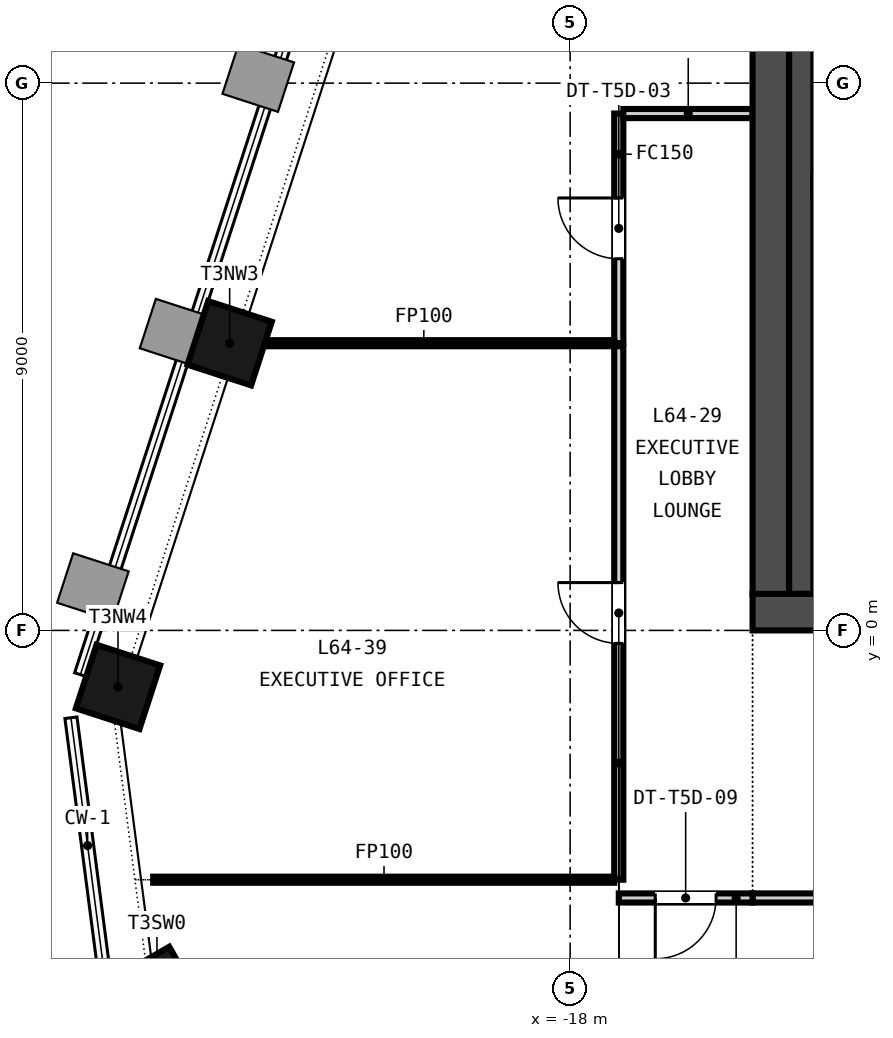
"""IFC4 building model, lengths in metres.
Left out: names, types, materials, properties, quantities, classifications, styles, units other than length and angle.
Written with IfcOpenShell. Run it as: python <this file> out.ifc"""

import sys

from ifc_helpers import new_model, si_unit, direction, frame, frame_2d, origin, origin_2d, place, context, subcontext, project, spatial, rectangle, extrude, element, fill, save


model = new_model("IFC4")
c1 = context("Model", 3, precision=1e-05, world=origin(), true_north=direction((0.0, 1.0)))
c2 = subcontext(c1, "Body", "Model", "MODEL_VIEW")
j1 = project(units=[si_unit("LENGTHUNIT", "METRE"), si_unit("PLANEANGLEUNIT", "RADIAN")], contexts=[c1])
p1 = place(None, origin())
s1 = spatial("IfcSite", under=j1, at=p1, CompositionType="ELEMENT")
p2 = place(p1, origin())
s2 = spatial("IfcBuilding", under=s1, at=p2, CompositionType="ELEMENT")
p3 = place(p2, frame((0.0, 0.0, 252.8)))
s3 = spatial("IfcBuildingStorey", under=s2, at=p3, CompositionType="ELEMENT", Elevation=252.8)
p4 = place(p3, frame((-15.0, 0.3, -0.15), z_axis=(0.0, 0.0, 1.0), x_axis=(1.0, 0.0, 0.0)))
e1 = element("IfcWall", 1, at=p4, inside=s3, PredefinedType="SOLIDWALL", context=c2, shape_type="SweptSolid", body=[
    extrude(rectangle(XDim=30.0, YDim=0.6, at=frame_2d((15.0, 0.0))), origin(), (0.0, 0.0, 1.0), 3.5),
])
p5 = place(p4, frame((5.8, 0.0, 0.15)))
e2 = element("IfcOpeningElement", 2, at=p5, cuts=e1, PredefinedType="OPENING", context=c2, shape_type="SweptSolid", body=[
    extrude(rectangle(XDim=2.4, YDim=2.4, at=frame_2d((1.2, 1.2))), frame((0.0, 0.31, 0.0), z_axis=(0.0, -1.0, 0.0), x_axis=(1.0, 0.0, 0.0)), (0.0, 0.0, 1.0), 0.62),
])
p6 = place(p4, frame((13.8, 0.0, 0.15)))
e3 = element("IfcOpeningElement", 3, at=p6, cuts=e1, PredefinedType="OPENING", context=c2, shape_type="SweptSolid", body=[
    extrude(rectangle(XDim=2.4, YDim=2.4, at=frame_2d((1.2, 1.2))), frame((0.0, 0.31, 0.0), z_axis=(0.0, -1.0, 0.0), x_axis=(1.0, 0.0, 0.0)), (0.0, 0.0, 1.0), 0.62),
])
p7 = place(p4, frame((21.8, 0.0, 0.15)))
e4 = element("IfcOpeningElement", 4, at=p7, cuts=e1, PredefinedType="OPENING", context=c2, shape_type="SweptSolid", body=[
    extrude(rectangle(XDim=2.4, YDim=2.4, at=frame_2d((1.2, 1.2))), frame((0.0, 0.31, 0.0), z_axis=(0.0, -1.0, 0.0), x_axis=(1.0, 0.0, 0.0)), (0.0, 0.0, 1.0), 0.62),
])
p8 = place(p4, frame((1.5, 0.0, 0.15)))
e5 = element("IfcOpeningElement", 5, at=p8, cuts=e1, PredefinedType="OPENING", context=c2, shape_type="SweptSolid", body=[
    extrude(rectangle(XDim=1.2, YDim=2.1, at=frame_2d((0.6, 1.05))), frame((0.0, 0.31, 0.0), z_axis=(0.0, -1.0, 0.0), x_axis=(1.0, 0.0, 0.0)), (0.0, 0.0, 1.0), 0.62),
])
p9 = place(p4, frame((27.3, 0.0, 0.15)))
e6 = element("IfcOpeningElement", 6, at=p9, cuts=e1, PredefinedType="OPENING", context=c2, shape_type="SweptSolid", body=[
    extrude(rectangle(XDim=1.2, YDim=2.1, at=frame_2d((0.6, 1.05))), frame((0.0, 0.31, 0.0), z_axis=(0.0, -1.0, 0.0), x_axis=(1.0, 0.0, 0.0)), (0.0, 0.0, 1.0), 0.62),
])
p10 = place(p3, frame((-14.7, 0.6, -0.15), z_axis=(0.0, 0.0, 1.0), x_axis=(0.0, 1.0, 0.0)))
e7 = element("IfcWall", 7, at=p10, inside=s3, PredefinedType="SOLIDWALL", context=c2, shape_type="SweptSolid", body=[
    extrude(rectangle(XDim=13.8, YDim=0.6, at=frame_2d((6.9, 0.0))), origin(), (0.0, 0.0, 1.0), 3.5),
])
for number, where, z_axis, x_axis in (
    (8, (-23.599, 4.723, -0.15), (0.0, 0.0, 1.0), (-0.309, -0.951, 0.0)),
    (9, (-25.436, -0.928, -0.15), (0.0, 0.0, 1.0), (-0.309, -0.951, 0.0)),
    (10, (-24.795, -5.954, -0.15), (0.0, 0.0, 1.0), (0.5, -0.866, 0.0)),
):
    element("IfcColumn", number, at=place(p3, frame(where, z_axis=z_axis, x_axis=x_axis)), inside=s3, PredefinedType="COLUMN", context=c2, shape_type="SweptSolid", body=[
        extrude(rectangle(XDim=1.1, YDim=1.1, at=origin_2d()), origin(), (0.0, 0.0, 1.0), 3.5),
    ])
p11 = place(p3, frame((-14.2, 0.6, 0.0), z_axis=(0.0, 0.0, 1.0), x_axis=(0.0, 1.0, 0.0)))
e11 = element("IfcWall", 11, at=p11, inside=s3, PredefinedType="SOLIDWALL", context=c2, shape_type="SweptSolid", body=[
    extrude(rectangle(XDim=13.8, YDim=0.4, at=frame_2d((6.9, 0.0))), origin(), (0.0, 0.0, 1.0), 3.35),
])
p12 = place(p3, frame((-0.867, -4.4, 0.0), z_axis=(0.0, 0.0, 1.0), x_axis=(-1.0, 0.0, 0.0)))
e12 = element("IfcWall", 12, at=p12, inside=s3, PredefinedType="PARTITIONING", context=c2, shape_type="SweptSolid", body=[
    extrude(rectangle(XDim=14.133, YDim=0.15, at=frame_2d((7.066, 0.0))), origin(), (0.0, 0.0, 1.0), 2.601),
])
p13 = place(p12, frame((6.167, 0.0, 0.0)))
e13 = element("IfcOpeningElement", 13, at=p13, cuts=e12, PredefinedType="OPENING", context=c2, shape_type="SweptSolid", body=[
    extrude(rectangle(XDim=1.8, YDim=2.1, at=frame_2d((0.9, 1.05))), frame((0.0, 0.085, 0.0), z_axis=(0.0, -1.0, 0.0), x_axis=(1.0, 0.0, 0.0)), (0.0, 0.0, 1.0), 0.17),
])
p14 = place(p3, frame((-15.0, -4.4, 0.0), z_axis=(0.0, 0.0, 1.0), x_axis=(-1.0, 0.0, 0.0)))
e14 = element("IfcWall", 14, at=p14, inside=s3, PredefinedType="PARTITIONING", context=c2, shape_type="SweptSolid", body=[
    extrude(rectangle(XDim=2.2, YDim=0.15, at=frame_2d((1.1, 0.0))), origin(), (0.0, 0.0, 1.0), 2.601),
])
p15 = place(p14, frame((0.6, 0.0, 0.0)))
e15 = element("IfcOpeningElement", 15, at=p15, cuts=e14, PredefinedType="OPENING", context=c2, shape_type="SweptSolid", body=[
    extrude(rectangle(XDim=1.0, YDim=2.1, at=frame_2d((0.5, 1.05))), frame((0.0, 0.085, 0.0), z_axis=(0.0, -1.0, 0.0), x_axis=(1.0, 0.0, 0.0)), (0.0, 0.0, 1.0), 0.17),
])
p16 = place(p3, frame((-17.2, 4.723, 0.0), z_axis=(0.0, 0.0, 1.0), x_axis=(0.0, 1.0, 0.0)))
e16 = element("IfcWall", 16, at=p16, inside=s3, PredefinedType="PARTITIONING", context=c2, shape_type="SweptSolid", body=[
    extrude(rectangle(XDim=3.777, YDim=0.15, at=frame_2d((1.889, 0.0))), origin(), (0.0, 0.0, 1.0), 2.601),
])
p17 = place(p16, frame((1.388, 0.0, 0.0)))
e17 = element("IfcOpeningElement", 17, at=p17, cuts=e16, PredefinedType="OPENING", context=c2, shape_type="SweptSolid", body=[
    extrude(rectangle(XDim=1.0, YDim=2.1, at=frame_2d((0.5, 1.05))), frame((0.0, 0.085, 0.0), z_axis=(0.0, -1.0, 0.0), x_axis=(1.0, 0.0, 0.0)), (0.0, 0.0, 1.0), 0.17),
])
p18 = place(p3, frame((-17.125, 8.5, 0.0), z_axis=(0.0, 0.0, 1.0), x_axis=(1.0, 0.0, 0.0)))
e18 = element("IfcWall", 18, at=p18, inside=s3, PredefinedType="PARTITIONING", context=c2, shape_type="SweptSolid", body=[
    extrude(rectangle(XDim=2.125, YDim=0.15, at=frame_2d((1.062, 0.0))), origin(), (0.0, 0.0, 1.0), 2.601),
])
p19 = place(p3, frame((-23.547, 4.723, 0.0), z_axis=(0.0, 0.0, 1.0), x_axis=(1.0, 0.0, 0.0)))
e19 = element("IfcWall", 19, at=p19, inside=s3, PredefinedType="PARTITIONING", context=c2, shape_type="SweptSolid", body=[
    extrude(rectangle(XDim=6.272, YDim=0.1, at=frame_2d((3.136, 0.0))), origin(), (0.0, 0.0, 1.0), 2.601),
])
p20 = place(p3, frame((-17.2, -4.1, 0.0), z_axis=(0.0, 0.0, 1.0), x_axis=(0.0, 1.0, 0.0)))
e20 = element("IfcWall", 20, at=p20, inside=s3, PredefinedType="PARTITIONING", context=c2, shape_type="SweptSolid", body=[
    extrude(rectangle(XDim=8.773, YDim=0.15, at=frame_2d((4.387, 0.0))), origin(), (0.0, 0.0, 1.0), 2.601),
])
p21 = place(p20, frame((3.886, 0.0, 0.0)))
e21 = element("IfcOpeningElement", 21, at=p21, cuts=e20, PredefinedType="OPENING", context=c2, shape_type="SweptSolid", body=[
    extrude(rectangle(XDim=1.0, YDim=2.1, at=frame_2d((0.5, 1.05))), frame((0.0, 0.085, 0.0), z_axis=(0.0, -1.0, 0.0), x_axis=(1.0, 0.0, 0.0)), (0.0, 0.0, 1.0), 0.17),
])
p22 = place(p3, frame((-24.857, -4.1, 0.0), z_axis=(0.0, 0.0, 1.0), x_axis=(1.0, 0.0, 0.0)))
e22 = element("IfcWall", 22, at=p22, inside=s3, PredefinedType="PARTITIONING", context=c2, shape_type="SweptSolid", body=[
    extrude(rectangle(XDim=7.582, YDim=0.1, at=frame_2d((3.791, 0.0))), origin(), (0.0, 0.0, 1.0), 2.601),
])
p23 = place(p17, origin())
e23 = element("IfcDoor", 23, at=p23, inside=s3, OperationType="SINGLE_SWING_RIGHT", PredefinedType="DOOR", context=c2, shape_type="SweptSolid", body=[
    extrude(rectangle(XDim=1.0, YDim=2.1, at=frame_2d((0.5, 1.05))), frame((0.0, 0.025, 0.0), z_axis=(0.0, -1.0, 0.0), x_axis=(1.0, 0.0, 0.0)), (0.0, 0.0, 1.0), 0.05),
])
fill(e17, e23)
p24 = place(p15, origin())
e24 = element("IfcDoor", 24, at=p24, inside=s3, OperationType="SINGLE_SWING_RIGHT", PredefinedType="DOOR", context=c2, shape_type="SweptSolid", body=[
    extrude(rectangle(XDim=1.0, YDim=2.1, at=frame_2d((0.5, 1.05))), frame((0.0, 0.025, 0.0), z_axis=(0.0, -1.0, 0.0), x_axis=(1.0, 0.0, 0.0)), (0.0, 0.0, 1.0), 0.05),
])
fill(e15, e24)
p25 = place(p21, origin())
e25 = element("IfcDoor", 25, at=p25, inside=s3, OperationType="SINGLE_SWING_RIGHT", PredefinedType="DOOR", context=c2, shape_type="SweptSolid", body=[
    extrude(rectangle(XDim=1.0, YDim=2.1, at=frame_2d((0.5, 1.05))), frame((0.0, 0.025, 0.0), z_axis=(0.0, -1.0, 0.0), x_axis=(1.0, 0.0, 0.0)), (0.0, 0.0, 1.0), 0.05),
])
fill(e21, e25)
save(model, sys.argv[1])
